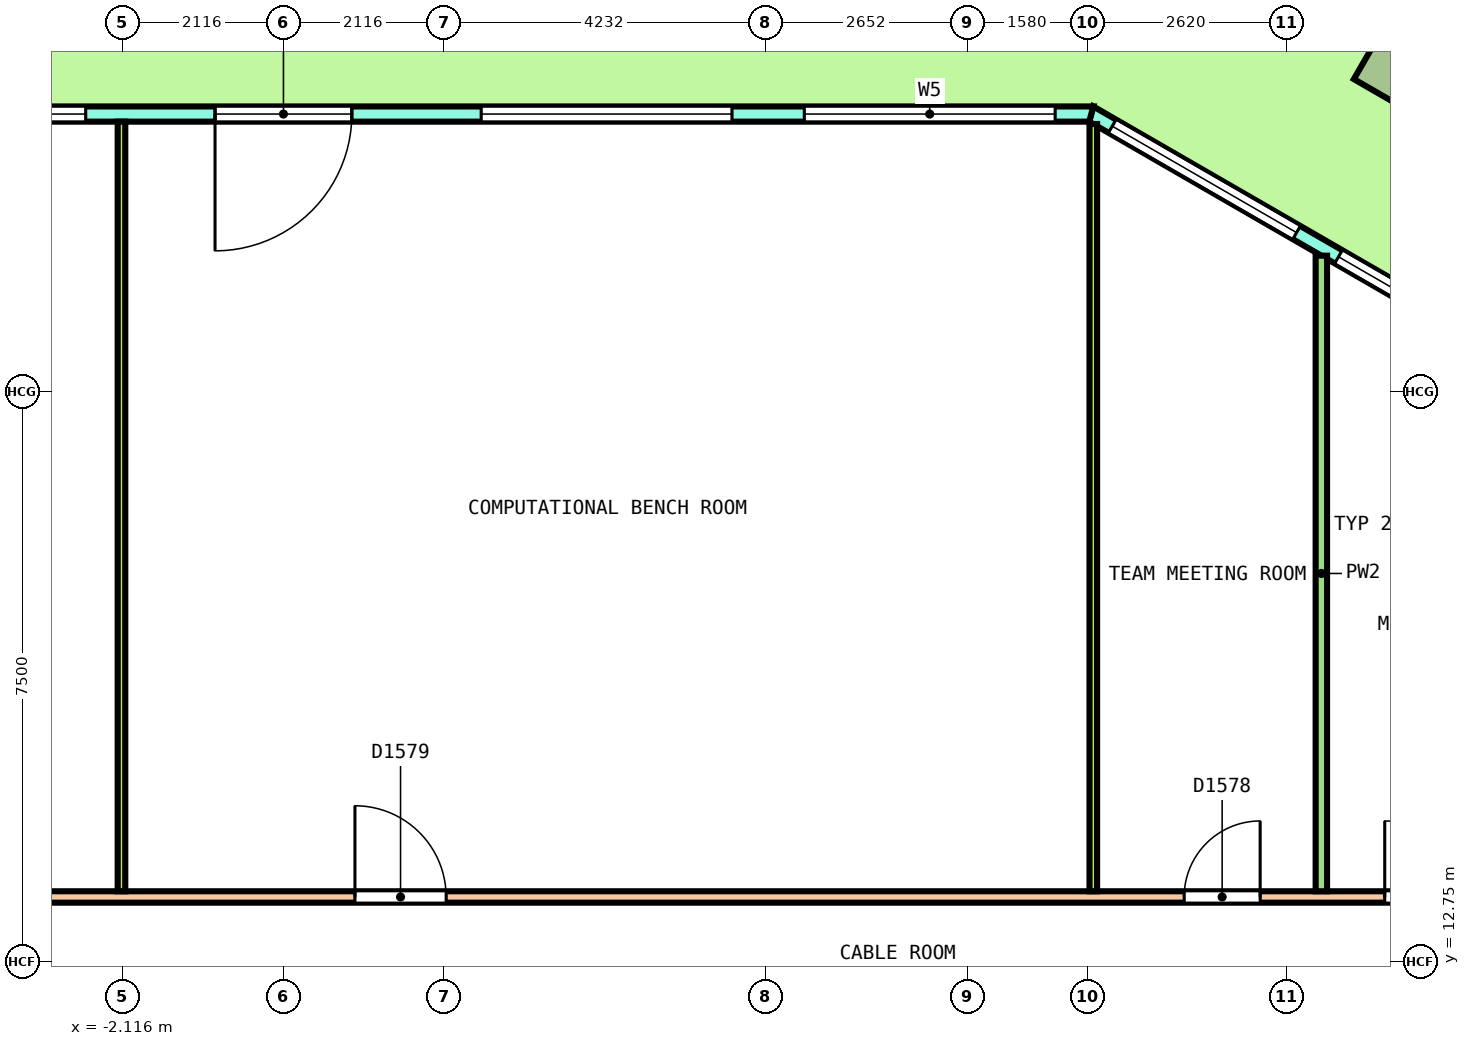
"""IFC4 building model, lengths in metres.
Left out: names, types, materials, properties, quantities, classifications, styles, units other than length and angle.
Written with IfcOpenShell. Run it as: python <this file> out.ifc"""

import sys

from ifc_helpers import new_model, si_unit, direction, frame, frame_2d, origin, origin_2d, place, context, subcontext, project, spatial, polyline, rectangle, outline, extrude, element, fill, save


model = new_model("IFC4")
c1 = context("Model", 3, precision=1e-05, world=origin(), true_north=direction((0.0, 1.0)))
c2 = subcontext(c1, "Body", "Model", "MODEL_VIEW")
j1 = project(units=[si_unit("LENGTHUNIT", "METRE"), si_unit("PLANEANGLEUNIT", "RADIAN")], contexts=[c1])
p1 = place(None, origin())
s1 = spatial("IfcSite", under=j1, at=p1, CompositionType="ELEMENT")
p2 = place(p1, origin())
s2 = spatial("IfcBuilding", under=s1, at=p2, CompositionType="ELEMENT")
p3 = place(p2, frame((0.0, 0.0, 102.8)))
s3 = spatial("IfcBuildingStorey", under=s2, at=p3, CompositionType="ELEMENT", Elevation=102.8)
p4 = place(p3, frame((15.005, 24.606, 0.0), z_axis=(0.036265236264, 0.0, 0.999342199969), x_axis=(-0.865313546461, 0.500246354177, 0.031401456084)))
e1 = element("IfcColumn", 1, at=p4, inside=s3, PredefinedType="COLUMN", context=c2, shape_type="SweptSolid", body=[
    extrude(rectangle(XDim=1.35, YDim=1.35, at=origin_2d()), origin(), (0.0, 0.0, 1.0), 4.053),
])
p5 = place(p3, frame((16.582, 20.463, 0.0), z_axis=(0.0, 0.0, 1.0), x_axis=(-0.866029458321, 0.49999297727, 0.0)))
e2 = element("IfcWall", 2, at=p5, inside=s3, PredefinedType="SOLIDWALL", context=c2, shape_type="SweptSolid", body=[
    extrude(outline(polyline([(-0.027, -0.1), (1.128, -0.1), (2.282, -0.1), (3.437, -0.1), (4.592, -0.1), (5.747, -0.1), (6.901, -0.1), (6.848, 0.1), (5.711, 0.1), (4.574, 0.1), (3.437, 0.1), (2.301, 0.1), (1.164, 0.1), (0.027, 0.1), (-0.027, -0.1)])), origin(), (0.0, 0.0, 1.0), 4.1),
])
p6 = place(p5, frame((0.319, 0.0, 0.1)))
e3 = element("IfcOpeningElement", 3, at=p6, cuts=e2, PredefinedType="OPENING", context=c2, shape_type="SweptSolid", body=[
    extrude(rectangle(XDim=2.8, YDim=2.9, at=frame_2d((1.4, 1.45))), frame((0.0, 0.11, 0.0), z_axis=(0.0, -1.0, 0.0), x_axis=(1.0, 0.0, 0.0)), (0.0, 0.0, 1.0), 0.22),
])
p7 = place(p5, frame((3.756, 0.0, 0.1)))
e4 = element("IfcOpeningElement", 4, at=p7, cuts=e2, PredefinedType="OPENING", context=c2, shape_type="SweptSolid", body=[
    extrude(rectangle(XDim=2.8, YDim=2.9, at=frame_2d((1.4, 1.45))), frame((0.0, 0.11, 0.0), z_axis=(0.0, -1.0, 0.0), x_axis=(1.0, 0.0, 0.0)), (0.0, 0.0, 1.0), 0.22),
])
p8 = place(p3, frame((10.628, 23.9, 0.0), z_axis=(0.0, 0.0, 1.0), x_axis=(-1.0, 0.0, 0.0)))
e5 = element("IfcWall", 5, at=p8, inside=s3, PredefinedType="SOLIDWALL", context=c2, shape_type="SweptSolid", body=[
    extrude(outline(polyline([(-0.027, -0.1), (0.988, -0.1), (2.003, -0.1), (3.017, -0.1), (4.032, -0.1), (5.047, -0.1), (6.062, -0.1), (7.076, -0.1), (8.091, -0.1), (9.106, -0.1), (10.121, -0.1), (11.135, -0.1), (12.15, -0.1), (13.165, -0.1), (14.179, -0.1), (15.194, -0.1), (16.209, -0.1), (17.224, -0.1), (18.239, -0.1), (19.253, -0.1), (20.268, -0.1), (21.283, -0.1), (21.229, 0.1), (20.219, 0.1), (19.21, 0.1), (18.2, 0.1), (17.19, 0.1), (16.181, 0.1), (15.171, 0.1), (14.162, 0.1), (13.152, 0.1), (12.142, 0.1), (11.133, 0.1), (10.123, 0.1), (9.114, 0.1), (8.104, 0.1), (7.094, 0.1), (6.085, 0.1), (5.075, 0.1), (4.065, 0.1), (3.056, 0.1), (2.046, 0.1), (1.036, 0.1), (0.027, 0.1), (-0.027, -0.1)])), origin(), (0.0, 0.0, 1.0), 4.1),
])
p9 = place(p8, frame((0.476, 0.0, 0.1)))
e6 = element("IfcOpeningElement", 6, at=p9, cuts=e5, PredefinedType="OPENING", context=c2, shape_type="SweptSolid", body=[
    extrude(rectangle(XDim=3.3, YDim=2.9, at=frame_2d((1.65, 1.45))), frame((0.0, 0.11, 0.0), z_axis=(0.0, -1.0, 0.0), x_axis=(1.0, 0.0, 0.0)), (0.0, 0.0, 1.0), 0.22),
])
p10 = place(p8, frame((4.727, 0.0, 0.1)))
e7 = element("IfcOpeningElement", 7, at=p10, cuts=e5, PredefinedType="OPENING", context=c2, shape_type="SweptSolid", body=[
    extrude(rectangle(XDim=3.3, YDim=2.9, at=frame_2d((1.65, 1.45))), frame((0.0, 0.11, 0.0), z_axis=(0.0, -1.0, 0.0), x_axis=(1.0, 0.0, 0.0)), (0.0, 0.0, 1.0), 0.22),
])
p11 = place(p8, frame((9.728, 0.0, 0.0)))
e8 = element("IfcOpeningElement", 8, at=p11, cuts=e5, PredefinedType="OPENING", context=c2, shape_type="SweptSolid", body=[
    extrude(rectangle(XDim=1.8, YDim=2.4, at=frame_2d((0.9, 1.2))), frame((0.0, 0.11, 0.0), z_axis=(0.0, -1.0, 0.0), x_axis=(1.0, 0.0, 0.0)), (0.0, 0.0, 1.0), 0.22),
])
p12 = place(p8, frame((9.728, 0.0, 2.55)))
e9 = element("IfcOpeningElement", 9, at=p12, cuts=e5, PredefinedType="OPENING", context=c2, shape_type="SweptSolid", body=[
    extrude(rectangle(XDim=1.8, YDim=0.45, at=frame_2d((0.9, 0.225))), frame((0.0, 0.11, 0.0), z_axis=(0.0, -1.0, 0.0), x_axis=(1.0, 0.0, 0.0)), (0.0, 0.0, 1.0), 0.22),
])
p13 = place(p8, frame((13.229, 0.0, 0.1)))
e10 = element("IfcOpeningElement", 10, at=p13, cuts=e5, PredefinedType="OPENING", context=c2, shape_type="SweptSolid", body=[
    extrude(rectangle(XDim=3.3, YDim=2.9, at=frame_2d((1.65, 1.45))), frame((0.0, 0.11, 0.0), z_axis=(0.0, -1.0, 0.0), x_axis=(1.0, 0.0, 0.0)), (0.0, 0.0, 1.0), 0.22),
])
p14 = place(p8, frame((17.48, 0.0, 0.1)))
e11 = element("IfcOpeningElement", 11, at=p14, cuts=e5, PredefinedType="OPENING", context=c2, shape_type="SweptSolid", body=[
    extrude(rectangle(XDim=3.3, YDim=2.9, at=frame_2d((1.65, 1.45))), frame((0.0, 0.11, 0.0), z_axis=(0.0, -1.0, 0.0), x_axis=(1.0, 0.0, 0.0)), (0.0, 0.0, 1.0), 0.22),
])
p15 = place(p3, frame((-15.925, 13.6, 0.0), z_axis=(0.0, 0.0, 1.0), x_axis=(1.0, 0.0, 0.0)))
e12 = element("IfcWall", 12, at=p15, inside=s3, PredefinedType="PARTITIONING", context=c2, shape_type="SweptSolid", body=[
    extrude(rectangle(XDim=31.85, YDim=0.15, at=frame_2d((15.925, 0.0))), origin(), (0.0, 0.0, 1.0), 3.05),
])
p16 = place(p15, frame((30.414, 0.0, 0.0)))
e13 = element("IfcOpeningElement", 13, at=p16, cuts=e12, PredefinedType="OPENING", context=c2, shape_type="SweptSolid", body=[
    extrude(rectangle(XDim=1.0, YDim=2.1, at=frame_2d((0.5, 1.05))), frame((0.0, 0.085, 0.0), z_axis=(0.0, -1.0, 0.0), x_axis=(1.0, 0.0, 0.0)), (0.0, 0.0, 1.0), 0.17),
])
p17 = place(p15, frame((27.775, 0.0, 0.0)))
e14 = element("IfcOpeningElement", 14, at=p17, cuts=e12, PredefinedType="OPENING", context=c2, shape_type="SweptSolid", body=[
    extrude(rectangle(XDim=1.0, YDim=2.1, at=frame_2d((0.5, 1.05))), frame((0.0, 0.085, 0.0), z_axis=(0.0, -1.0, 0.0), x_axis=(1.0, 0.0, 0.0)), (0.0, 0.0, 1.0), 0.17),
])
p18 = place(p15, frame((16.865, 0.0, 0.0)))
e15 = element("IfcOpeningElement", 15, at=p18, cuts=e12, PredefinedType="OPENING", context=c2, shape_type="SweptSolid", body=[
    extrude(rectangle(XDim=1.2, YDim=2.1, at=frame_2d((0.6, 1.05))), frame((0.0, 0.085, 0.0), z_axis=(0.0, -1.0, 0.0), x_axis=(1.0, 0.0, 0.0)), (0.0, 0.0, 1.0), 0.17),
])
p19 = place(p15, frame((10.738, 0.0, 0.0)))
e16 = element("IfcOpeningElement", 16, at=p19, cuts=e12, PredefinedType="OPENING", context=c2, shape_type="SweptSolid", body=[
    extrude(rectangle(XDim=1.0, YDim=2.1, at=frame_2d((0.5, 1.05))), frame((0.0, 0.085, 0.0), z_axis=(0.0, -1.0, 0.0), x_axis=(1.0, 0.0, 0.0)), (0.0, 0.0, 1.0), 0.17),
])
p20 = place(p15, frame((3.075, 0.0, 0.0)))
e17 = element("IfcOpeningElement", 17, at=p20, cuts=e12, PredefinedType="OPENING", context=c2, shape_type="SweptSolid", body=[
    extrude(rectangle(XDim=1.0, YDim=2.1, at=frame_2d((0.5, 1.05))), frame((0.0, 0.085, 0.0), z_axis=(0.0, -1.0, 0.0), x_axis=(1.0, 0.0, 0.0)), (0.0, 0.0, 1.0), 0.17),
])
p21 = place(p15, frame((0.759, 0.0, 0.0)))
e18 = element("IfcOpeningElement", 18, at=p21, cuts=e12, PredefinedType="OPENING", context=c2, shape_type="SweptSolid", body=[
    extrude(rectangle(XDim=1.0, YDim=2.1, at=frame_2d((0.5, 1.05))), frame((0.0, 0.085, 0.0), z_axis=(0.0, -1.0, 0.0), x_axis=(1.0, 0.0, 0.0)), (0.0, 0.0, 1.0), 0.17),
])
p22 = place(p3, frame((13.655, 13.675, 0.0), z_axis=(0.0, 0.0, 1.0), x_axis=(0.0, 1.0, 0.0)))
e19 = element("IfcWall", 19, at=p22, inside=s3, PredefinedType="PARTITIONING", context=c2, shape_type="SweptSolid", body=[
    extrude(rectangle(XDim=8.362, YDim=0.15, at=frame_2d((4.181, 0.0))), origin(), (0.0, 0.0, 1.0), 3.05),
])
p23 = place(p3, frame((10.655, 13.675, 0.0), z_axis=(0.0, 0.0, 1.0), x_axis=(0.0, 1.0, 0.0)))
e20 = element("IfcWall", 20, at=p23, inside=s3, PredefinedType="PARTITIONING", context=c2, shape_type="SweptSolid", body=[
    extrude(rectangle(XDim=10.094, YDim=0.1, at=frame_2d((5.047, 0.0))), origin(), (0.0, 0.0, 1.0), 3.05),
])
p24 = place(p3, frame((-2.131, 13.675, 0.0), z_axis=(0.0, 0.0, 1.0), x_axis=(0.0, 1.0, 0.0)))
e21 = element("IfcWall", 21, at=p24, inside=s3, PredefinedType="PARTITIONING", context=c2, shape_type="SweptSolid", body=[
    extrude(rectangle(XDim=10.125, YDim=0.1, at=frame_2d((5.062, 0.0))), origin(), (0.0, 0.0, 1.0), 3.05),
])
p25 = place(p6, origin())
e22 = element("IfcWindow", 22, at=p25, inside=s3, PartitioningType="SINGLE_PANEL", PredefinedType="WINDOW", context=c2, shape_type="SweptSolid", body=[
    extrude(rectangle(XDim=2.8, YDim=2.9, at=frame_2d((1.4, 1.45))), frame((0.0, 0.03, 0.0), z_axis=(0.0, -1.0, 0.0), x_axis=(1.0, 0.0, 0.0)), (0.0, 0.0, 1.0), 0.06),
])
fill(e3, e22)
p26 = place(p7, origin())
e23 = element("IfcWindow", 23, at=p26, inside=s3, PartitioningType="SINGLE_PANEL", PredefinedType="WINDOW", context=c2, shape_type="SweptSolid", body=[
    extrude(rectangle(XDim=2.8, YDim=2.9, at=frame_2d((1.4, 1.45))), frame((0.0, 0.03, 0.0), z_axis=(0.0, -1.0, 0.0), x_axis=(1.0, 0.0, 0.0)), (0.0, 0.0, 1.0), 0.06),
])
fill(e4, e23)
p27 = place(p9, origin())
e24 = element("IfcWindow", 24, at=p27, inside=s3, PartitioningType="SINGLE_PANEL", PredefinedType="WINDOW", context=c2, shape_type="SweptSolid", body=[
    extrude(rectangle(XDim=3.3, YDim=2.9, at=frame_2d((1.65, 1.45))), frame((0.0, 0.03, 0.0), z_axis=(0.0, -1.0, 0.0), x_axis=(1.0, 0.0, 0.0)), (0.0, 0.0, 1.0), 0.06),
])
fill(e6, e24)
p28 = place(p10, origin())
e25 = element("IfcWindow", 25, at=p28, inside=s3, PartitioningType="SINGLE_PANEL", PredefinedType="WINDOW", context=c2, shape_type="SweptSolid", body=[
    extrude(rectangle(XDim=3.3, YDim=2.9, at=frame_2d((1.65, 1.45))), frame((0.0, 0.03, 0.0), z_axis=(0.0, -1.0, 0.0), x_axis=(1.0, 0.0, 0.0)), (0.0, 0.0, 1.0), 0.06),
])
fill(e7, e25)
p29 = place(p11, origin())
e26 = element("IfcDoor", 26, at=p29, inside=s3, OperationType="DOUBLE_DOOR_SINGLE_SWING", PredefinedType="DOOR", context=c2, shape_type="SweptSolid", body=[
    extrude(rectangle(XDim=1.8, YDim=2.4, at=frame_2d((0.9, 1.2))), frame((0.0, 0.025, 0.0), z_axis=(0.0, -1.0, 0.0), x_axis=(1.0, 0.0, 0.0)), (0.0, 0.0, 1.0), 0.05),
])
fill(e8, e26)
p30 = place(p12, origin())
e27 = element("IfcWindow", 27, at=p30, inside=s3, PartitioningType="SINGLE_PANEL", PredefinedType="WINDOW", context=c2, shape_type="SweptSolid", body=[
    extrude(rectangle(XDim=1.8, YDim=0.45, at=frame_2d((0.9, 0.225))), frame((0.0, 0.03, 0.0), z_axis=(0.0, -1.0, 0.0), x_axis=(1.0, 0.0, 0.0)), (0.0, 0.0, 1.0), 0.06),
])
fill(e9, e27)
p31 = place(p13, origin())
e28 = element("IfcWindow", 28, at=p31, inside=s3, PartitioningType="SINGLE_PANEL", PredefinedType="WINDOW", context=c2, shape_type="SweptSolid", body=[
    extrude(rectangle(XDim=3.3, YDim=2.9, at=frame_2d((1.65, 1.45))), frame((0.0, 0.03, 0.0), z_axis=(0.0, -1.0, 0.0), x_axis=(1.0, 0.0, 0.0)), (0.0, 0.0, 1.0), 0.06),
])
fill(e10, e28)
p32 = place(p16, origin())
e29 = element("IfcDoor", 29, at=p32, inside=s3, OperationType="SINGLE_SWING_LEFT", PredefinedType="DOOR", context=c2, shape_type="SweptSolid", body=[
    extrude(rectangle(XDim=1.0, YDim=2.1, at=frame_2d((0.5, 1.05))), frame((0.0, 0.025, 0.0), z_axis=(0.0, -1.0, 0.0), x_axis=(1.0, 0.0, 0.0)), (0.0, 0.0, 1.0), 0.05),
])
fill(e13, e29)
p33 = place(p17, origin())
e30 = element("IfcDoor", 30, at=p33, inside=s3, OperationType="SINGLE_SWING_RIGHT", PredefinedType="DOOR", context=c2, shape_type="SweptSolid", body=[
    extrude(rectangle(XDim=1.0, YDim=2.1, at=frame_2d((0.5, 1.05))), frame((0.0, 0.025, 0.0), z_axis=(0.0, -1.0, 0.0), x_axis=(1.0, 0.0, 0.0)), (0.0, 0.0, 1.0), 0.05),
])
fill(e14, e30)
p34 = place(p18, origin())
e31 = element("IfcDoor", 31, at=p34, inside=s3, OperationType="DOUBLE_DOOR_SINGLE_SWING", PredefinedType="DOOR", context=c2, shape_type="SweptSolid", body=[
    extrude(rectangle(XDim=1.2, YDim=2.1, at=frame_2d((0.6, 1.05))), frame((0.0, 0.025, 0.0), z_axis=(0.0, -1.0, 0.0), x_axis=(1.0, 0.0, 0.0)), (0.0, 0.0, 1.0), 0.05),
])
fill(e15, e31)
save(model, sys.argv[1])
